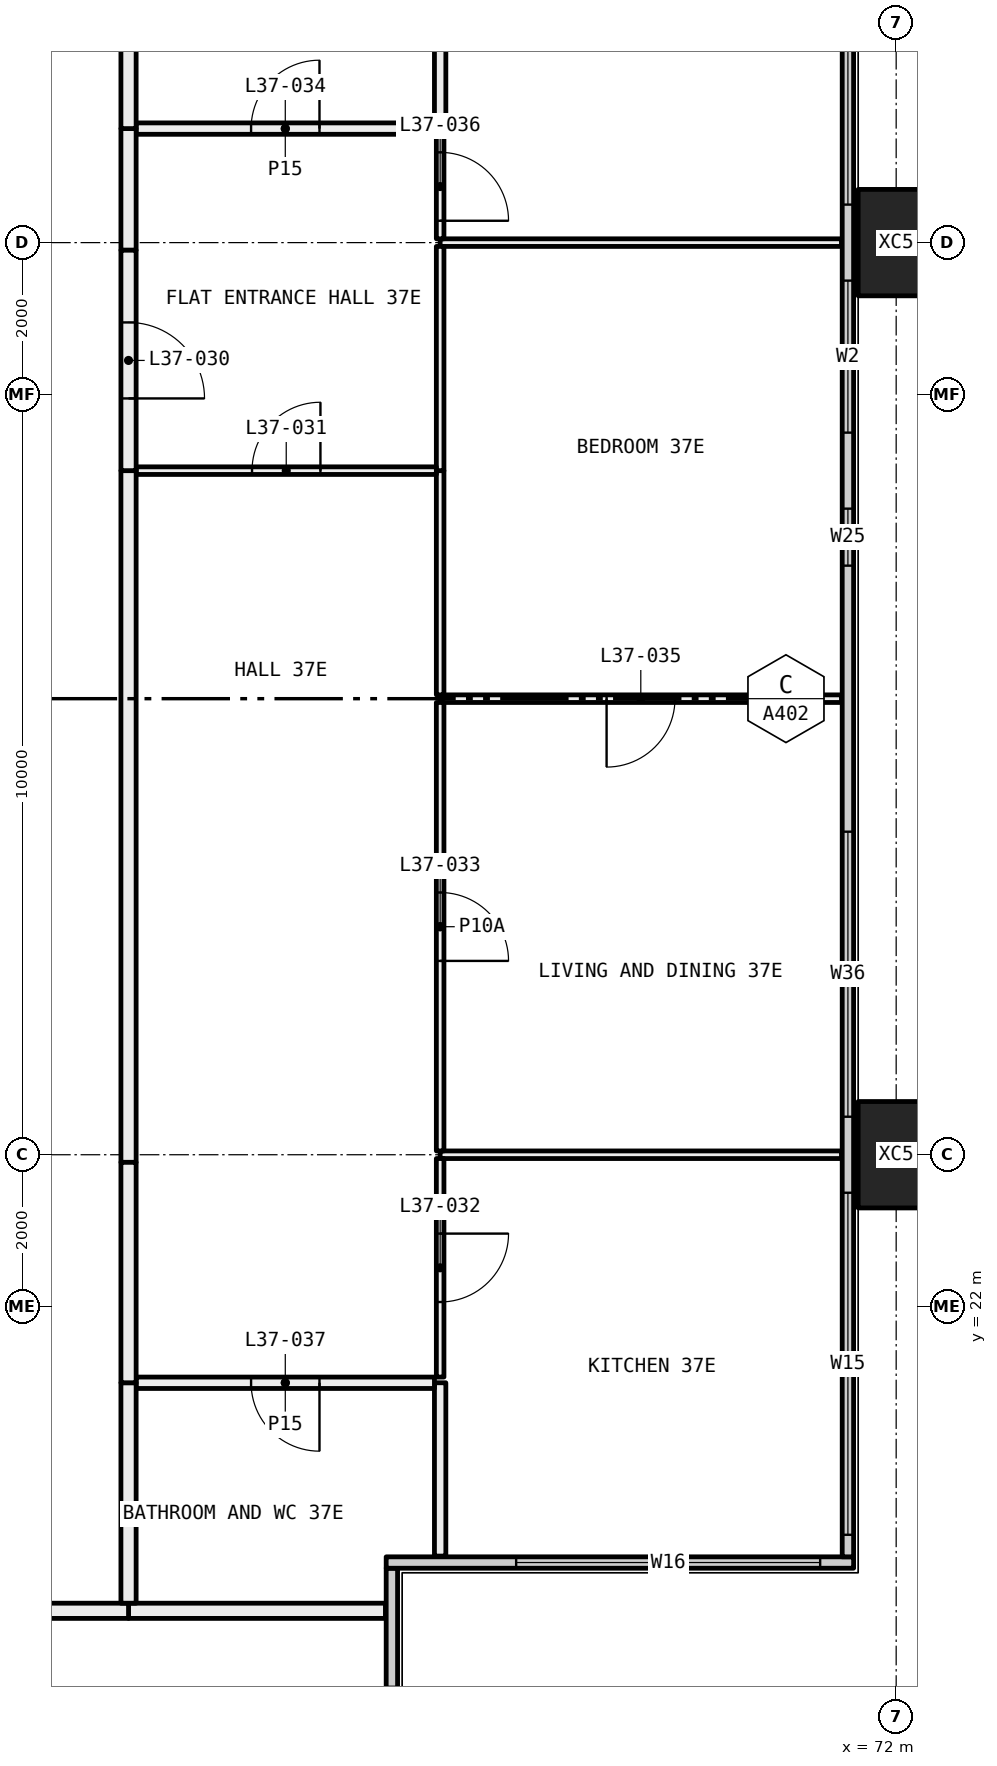
"""IFC4 building model, lengths in metres.
Left out: names, types, materials, properties, quantities, classifications, styles, units other than length and angle.
Written with IfcOpenShell. Run it as: python <this file> out.ifc"""

import sys

from ifc_helpers import new_model, si_unit, direction, frame, frame_2d, origin, origin_2d, place, context, subcontext, project, spatial, rectangle, hollow_rectangle, extrude, element, fill, save


model = new_model("IFC4")
c1 = context("Model", 3, precision=1e-05, world=origin(), true_north=direction((0.0, 1.0)))
c2 = subcontext(c1, "Body", "Model", "MODEL_VIEW")
j1 = project(units=[si_unit("LENGTHUNIT", "METRE"), si_unit("PLANEANGLEUNIT", "RADIAN")], contexts=[c1])
p1 = place(None, origin())
s1 = spatial("IfcSite", under=j1, at=p1, CompositionType="ELEMENT")
p2 = place(p1, origin())
s2 = spatial("IfcBuilding", under=s1, at=p2, CompositionType="ELEMENT")
p3 = place(p2, frame((0.0, 0.0, 141.45)))
s3 = spatial("IfcBuildingStorey", under=s2, at=p3, CompositionType="ELEMENT", Elevation=141.45)
for number, where, z_axis, x_axis in (
    (1, (72.0, 24.0, -0.4), (0.0, 0.0, 1.0), (0.0, 1.0, 0.0)),
    (2, (72.0, 36.0, -0.4), (0.0, 0.0, 1.0), (0.0, 1.0, 0.0)),
):
    element("IfcColumn", number, at=place(p3, frame(where, z_axis=z_axis, x_axis=x_axis)), inside=s3, PredefinedType="COLUMN", context=c2, shape_type="SweptSolid", body=[
        extrude(hollow_rectangle(XDim=1.4, YDim=1.0, WallThickness=0.055, at=origin_2d()), origin(), (0.0, 0.0, 1.0), 3.45),
    ])
p4 = place(p3, frame((65.365, 12.71, 0.0), z_axis=(0.0, 0.0, 1.0), x_axis=(0.0, 1.0, 0.0)))
e3 = element("IfcWall", 3, at=p4, inside=s3, PredefinedType="ELEMENTEDWALL", context=c2, shape_type="SweptSolid", body=[
    extrude(rectangle(XDim=5.85, YDim=0.15, at=frame_2d((2.925, 0.0))), origin(), (0.0, 0.0, 1.0), 3.05),
])
p5 = place(p4, frame((0.29, 0.0, 0.45)))
e4 = element("IfcOpeningElement", 4, at=p5, cuts=e3, PredefinedType="OPENING", context=c2, shape_type="SweptSolid", body=[
    extrude(rectangle(XDim=4.0, YDim=2.55, at=frame_2d((2.0, 1.275))), frame((0.0, 0.085, 0.0), z_axis=(0.0, -1.0, 0.0), x_axis=(1.0, 0.0, 0.0)), (0.0, 0.0, 1.0), 0.17),
])
p6 = place(p3, frame((65.29, 18.635, 0.0), z_axis=(0.0, 0.0, 1.0), x_axis=(1.0, 0.0, 0.0)))
e5 = element("IfcWall", 5, at=p6, inside=s3, PredefinedType="ELEMENTEDWALL", context=c2, shape_type="SweptSolid", body=[
    extrude(rectangle(XDim=6.15, YDim=0.15, at=frame_2d((3.075, 0.0))), origin(), (0.0, 0.0, 1.0), 3.05),
])
p7 = place(p6, frame((1.71, 0.0, 0.45)))
e6 = element("IfcOpeningElement", 6, at=p7, cuts=e5, PredefinedType="OPENING", context=c2, shape_type="SweptSolid", body=[
    extrude(rectangle(XDim=4.0, YDim=2.55, at=frame_2d((2.0, 1.275))), frame((0.0, 0.085, 0.0), z_axis=(0.0, -1.0, 0.0), x_axis=(1.0, 0.0, 0.0)), (0.0, 0.0, 1.0), 0.17),
])
p8 = place(p3, frame((71.365, 18.71, 0.0), z_axis=(0.0, 0.0, 1.0), x_axis=(0.0, 1.0, 0.0)))
e7 = element("IfcWall", 7, at=p8, inside=s3, PredefinedType="ELEMENTEDWALL", context=c2, shape_type="SweptSolid", body=[
    extrude(rectangle(XDim=22.58, YDim=0.15, at=frame_2d((11.29, 0.0))), origin(), (0.0, 0.0, 1.0), 3.05),
])
p9 = place(p8, frame((0.29, 0.0, 0.45)))
e8 = element("IfcOpeningElement", 8, at=p9, cuts=e7, PredefinedType="OPENING", context=c2, shape_type="SweptSolid", body=[
    extrude(rectangle(XDim=4.5, YDim=2.55, at=frame_2d((2.25, 1.275))), frame((0.0, 0.085, 0.0), z_axis=(0.0, -1.0, 0.0), x_axis=(1.0, 0.0, 0.0)), (0.0, 0.0, 1.0), 0.17),
])
p10 = place(p8, frame((5.79, 0.0, 0.45)))
e9 = element("IfcOpeningElement", 9, at=p10, cuts=e7, PredefinedType="OPENING", context=c2, shape_type="SweptSolid", body=[
    extrude(rectangle(XDim=3.75, YDim=2.55, at=frame_2d((1.875, 1.275))), frame((0.0, 0.085, 0.0), z_axis=(0.0, -1.0, 0.0), x_axis=(1.0, 0.0, 0.0)), (0.0, 0.0, 1.0), 0.17),
])
p11 = place(p8, frame((13.04, 0.0, 0.45)))
e10 = element("IfcOpeningElement", 10, at=p11, cuts=e7, PredefinedType="OPENING", context=c2, shape_type="SweptSolid", body=[
    extrude(rectangle(XDim=0.75, YDim=2.55, at=frame_2d((0.375, 1.275))), frame((0.0, 0.085, 0.0), z_axis=(0.0, -1.0, 0.0), x_axis=(1.0, 0.0, 0.0)), (0.0, 0.0, 1.0), 0.17),
])
p12 = place(p8, frame((14.79, 0.0, 0.45)))
e11 = element("IfcOpeningElement", 11, at=p12, cuts=e7, PredefinedType="OPENING", context=c2, shape_type="SweptSolid", body=[
    extrude(rectangle(XDim=2.0, YDim=2.55, at=frame_2d((1.0, 1.275))), frame((0.0, 0.085, 0.0), z_axis=(0.0, -1.0, 0.0), x_axis=(1.0, 0.0, 0.0)), (0.0, 0.0, 1.0), 0.17),
])
p13 = place(p8, frame((17.79, 0.0, 0.45)))
e12 = element("IfcOpeningElement", 12, at=p13, cuts=e7, PredefinedType="OPENING", context=c2, shape_type="SweptSolid", body=[
    extrude(rectangle(XDim=4.5, YDim=2.55, at=frame_2d((2.25, 1.275))), frame((0.0, 0.085, 0.0), z_axis=(0.0, -1.0, 0.0), x_axis=(1.0, 0.0, 0.0)), (0.0, 0.0, 1.0), 0.17),
])
p14 = place(p3, frame((65.28, 18.0, 0.0), z_axis=(0.0, 0.0, 1.0), x_axis=(-1.0, 0.0, 0.0)))
e13 = element("IfcWall", 13, at=p14, inside=s3, PredefinedType="PARTITIONING", context=c2, shape_type="SweptSolid", body=[
    extrude(rectangle(XDim=3.38, YDim=0.2, at=frame_2d((1.69, 0.0))), origin(), (0.0, 0.0, 1.0), 3.05),
])
p15 = place(p3, frame((61.9, 18.0, 0.0), z_axis=(0.0, 0.0, 1.0), x_axis=(-1.0, 0.0, 0.0)))
e14 = element("IfcWall", 14, at=p15, inside=s3, PredefinedType="PARTITIONING", context=c2, shape_type="SweptSolid", body=[
    extrude(rectangle(XDim=1.9, YDim=0.2, at=frame_2d((0.95, 0.0))), origin(), (0.0, 0.0, 1.0), 3.05),
])
p16 = place(p3, frame((71.28, 24.0, 0.0), z_axis=(0.0, 0.0, 1.0), x_axis=(-1.0, 0.0, 0.0)))
e15 = element("IfcWall", 15, at=p16, inside=s3, PredefinedType="PARTITIONING", context=c2, shape_type="SweptSolid", body=[
    extrude(rectangle(XDim=5.28, YDim=0.1, at=frame_2d((2.64, 0.0))), origin(), (0.0, 0.0, 1.0), 2.45),
])
p17 = place(p3, frame((66.0, 21.0, 0.0), z_axis=(0.0, 0.0, 1.0), x_axis=(0.0, -1.0, 0.0)))
e16 = element("IfcWall", 16, at=p17, inside=s3, PredefinedType="PARTITIONING", context=c2, shape_type="SweptSolid", body=[
    extrude(rectangle(XDim=2.28, YDim=0.15, at=frame_2d((1.14, 0.0))), origin(), (0.0, 0.0, 1.0), 3.05),
])
p18 = place(p3, frame((66.0, 23.95, 0.0), z_axis=(0.0, 0.0, 1.0), x_axis=(0.0, -1.0, 0.0)))
e17 = element("IfcWall", 17, at=p18, inside=s3, PredefinedType="PARTITIONING", context=c2, shape_type="SweptSolid", body=[
    extrude(rectangle(XDim=2.875, YDim=0.1, at=frame_2d((1.438, 0.0))), origin(), (0.0, 0.0, 1.0), 2.45),
])
p19 = place(p18, frame((0.988, 0.0, 0.0)))
e18 = element("IfcOpeningElement", 18, at=p19, cuts=e17, PredefinedType="OPENING", context=c2, shape_type="SweptSolid", body=[
    extrude(rectangle(XDim=0.9, YDim=2.1, at=frame_2d((0.45, 1.05))), frame((0.0, 0.06, 0.0), z_axis=(0.0, -1.0, 0.0), x_axis=(1.0, 0.0, 0.0)), (0.0, 0.0, 1.0), 0.12),
])
p20 = place(p3, frame((71.28, 30.0, 0.0), z_axis=(0.0, 0.0, 1.0), x_axis=(-1.0, 0.0, 0.0)))
e19 = element("IfcWall", 19, at=p20, inside=s3, PredefinedType="PARTITIONING", context=c2, shape_type="SweptSolid", body=[
    extrude(rectangle(XDim=5.28, YDim=0.1, at=frame_2d((2.64, 0.0))), origin(), (0.0, 0.0, 1.0), 3.05),
])
p21 = place(p20, frame((2.19, 0.0, 0.0)))
e20 = element("IfcOpeningElement", 20, at=p21, cuts=e19, PredefinedType="OPENING", context=c2, shape_type="SweptSolid", body=[
    extrude(rectangle(XDim=0.9, YDim=2.1, at=frame_2d((0.45, 1.05))), frame((0.0, 0.06, 0.0), z_axis=(0.0, -1.0, 0.0), x_axis=(1.0, 0.0, 0.0)), (0.0, 0.0, 1.0), 0.12),
])
p22 = place(p3, frame((66.0, 29.95, 0.0), z_axis=(0.0, 0.0, 1.0), x_axis=(0.0, -1.0, 0.0)))
e21 = element("IfcWall", 21, at=p22, inside=s3, PredefinedType="PARTITIONING", context=c2, shape_type="SweptSolid", body=[
    extrude(rectangle(XDim=5.9, YDim=0.1, at=frame_2d((2.95, 0.0))), origin(), (0.0, 0.0, 1.0), 2.45),
])
p23 = place(p22, frame((2.5, 0.0, 0.0)))
e22 = element("IfcOpeningElement", 22, at=p23, cuts=e21, PredefinedType="OPENING", context=c2, shape_type="SweptSolid", body=[
    extrude(rectangle(XDim=0.9, YDim=2.1, at=frame_2d((0.45, 1.05))), frame((0.0, 0.06, 0.0), z_axis=(0.0, -1.0, 0.0), x_axis=(1.0, 0.0, 0.0)), (0.0, 0.0, 1.0), 0.12),
])
p24 = place(p3, frame((71.28, 36.0, 0.0), z_axis=(0.0, 0.0, 1.0), x_axis=(-1.0, 0.0, 0.0)))
e23 = element("IfcWall", 23, at=p24, inside=s3, PredefinedType="PARTITIONING", context=c2, shape_type="SweptSolid", body=[
    extrude(rectangle(XDim=5.28, YDim=0.1, at=frame_2d((2.64, 0.0))), origin(), (0.0, 0.0, 1.0), 2.45),
])
p25 = place(p3, frame((66.0, 33.0, 0.0), z_axis=(0.0, 0.0, 1.0), x_axis=(0.0, -1.0, 0.0)))
e24 = element("IfcWall", 24, at=p25, inside=s3, PredefinedType="PARTITIONING", context=c2, shape_type="SweptSolid", body=[
    extrude(rectangle(XDim=2.95, YDim=0.1, at=frame_2d((1.475, 0.0))), origin(), (0.0, 0.0, 1.0), 3.05),
])
p26 = place(p3, frame((66.0, 35.95, 0.0), z_axis=(0.0, 0.0, 1.0), x_axis=(0.0, -1.0, 0.0)))
e25 = element("IfcWall", 25, at=p26, inside=s3, PredefinedType="PARTITIONING", context=c2, shape_type="SweptSolid", body=[
    extrude(rectangle(XDim=2.95, YDim=0.1, at=frame_2d((1.475, 0.0))), origin(), (0.0, 0.0, 1.0), 2.45),
])
p27 = place(p3, frame((66.0, 37.425, 0.0), z_axis=(0.0, 0.0, 1.0), x_axis=(0.0, -1.0, 0.0)))
e26 = element("IfcWall", 26, at=p27, inside=s3, PredefinedType="PARTITIONING", context=c2, shape_type="SweptSolid", body=[
    extrude(rectangle(XDim=1.375, YDim=0.1, at=frame_2d((0.688, 0.0))), origin(), (0.0, 0.0, 1.0), 2.45),
])
p28 = place(p27, frame((0.238, 0.0, 0.0)))
e27 = element("IfcOpeningElement", 27, at=p28, cuts=e26, PredefinedType="OPENING", context=c2, shape_type="SweptSolid", body=[
    extrude(rectangle(XDim=0.9, YDim=2.1, at=frame_2d((0.45, 1.05))), frame((0.0, 0.06, 0.0), z_axis=(0.0, -1.0, 0.0), x_axis=(1.0, 0.0, 0.0)), (0.0, 0.0, 1.0), 0.12),
])
p29 = place(p3, frame((66.0, 41.28, 0.0), z_axis=(0.0, 0.0, 1.0), x_axis=(0.0, -1.0, 0.0)))
e28 = element("IfcWall", 28, at=p29, inside=s3, PredefinedType="PARTITIONING", context=c2, shape_type="SweptSolid", body=[
    extrude(rectangle(XDim=3.78, YDim=0.15, at=frame_2d((1.89, 0.0))), origin(), (0.0, 0.0, 1.0), 3.05),
])
p30 = place(p3, frame((65.925, 21.0, 0.0), z_axis=(0.0, 0.0, 1.0), x_axis=(-1.0, 0.0, 0.0)))
e29 = element("IfcWall", 29, at=p30, inside=s3, PredefinedType="PARTITIONING", context=c2, shape_type="SweptSolid", body=[
    extrude(rectangle(XDim=3.925, YDim=0.15, at=frame_2d((1.962, 0.0))), origin(), (0.0, 0.0, 1.0), 3.05),
])
p31 = place(p30, frame((1.512, 0.0, 0.0)))
e30 = element("IfcOpeningElement", 30, at=p31, cuts=e29, PredefinedType="OPENING", context=c2, shape_type="SweptSolid", body=[
    extrude(rectangle(XDim=0.9, YDim=2.1, at=frame_2d((0.45, 1.05))), frame((0.0, 0.085, 0.0), z_axis=(0.0, -1.0, 0.0), x_axis=(1.0, 0.0, 0.0)), (0.0, 0.0, 1.0), 0.17),
])
p32 = place(p3, frame((61.9, 21.0, 0.0), z_axis=(0.0, 0.0, 1.0), x_axis=(0.0, -1.0, 0.0)))
e31 = element("IfcWall", 31, at=p32, inside=s3, PredefinedType="PARTITIONING", context=c2, shape_type="SweptSolid", body=[
    extrude(rectangle(XDim=2.9, YDim=0.2, at=frame_2d((1.45, 0.0))), origin(), (0.0, 0.0, 1.0), 3.05),
])
p33 = place(p3, frame((65.95, 33.0, 0.0), z_axis=(0.0, 0.0, 1.0), x_axis=(-1.0, 0.0, 0.0)))
e32 = element("IfcWall", 32, at=p33, inside=s3, PredefinedType="PARTITIONING", context=c2, shape_type="SweptSolid", body=[
    extrude(rectangle(XDim=3.95, YDim=0.1, at=frame_2d((1.975, 0.0))), origin(), (0.0, 0.0, 1.0), 3.05),
])
p34 = place(p33, frame((1.525, 0.0, 0.0)))
e33 = element("IfcOpeningElement", 33, at=p34, cuts=e32, PredefinedType="OPENING", context=c2, shape_type="SweptSolid", body=[
    extrude(rectangle(XDim=0.9, YDim=2.1, at=frame_2d((0.45, 1.05))), frame((0.0, 0.06, 0.0), z_axis=(0.0, -1.0, 0.0), x_axis=(1.0, 0.0, 0.0)), (0.0, 0.0, 1.0), 0.12),
])
p35 = place(p3, frame((61.9, 33.0, 0.0), z_axis=(0.0, 0.0, 1.0), x_axis=(0.0, -1.0, 0.0)))
e34 = element("IfcWall", 34, at=p35, inside=s3, PredefinedType="PARTITIONING", context=c2, shape_type="SweptSolid", body=[
    extrude(rectangle(XDim=9.1, YDim=0.2, at=frame_2d((4.55, 0.0))), origin(), (0.0, 0.0, 1.0), 2.45),
])
p36 = place(p3, frame((61.9, 23.9, 0.0), z_axis=(0.0, 0.0, 1.0), x_axis=(0.0, -1.0, 0.0)))
e35 = element("IfcWall", 35, at=p36, inside=s3, PredefinedType="PARTITIONING", context=c2, shape_type="SweptSolid", body=[
    extrude(rectangle(XDim=2.9, YDim=0.2, at=frame_2d((1.45, 0.0))), origin(), (0.0, 0.0, 1.0), 3.05),
])
p37 = place(p3, frame((65.925, 37.5, 0.0), z_axis=(0.0, 0.0, 1.0), x_axis=(-1.0, 0.0, 0.0)))
e36 = element("IfcWall", 36, at=p37, inside=s3, PredefinedType="PARTITIONING", context=c2, shape_type="SweptSolid", body=[
    extrude(rectangle(XDim=3.925, YDim=0.15, at=frame_2d((1.962, 0.0))), origin(), (0.0, 0.0, 1.0), 3.05),
])
p38 = place(p37, frame((1.512, 0.0, 0.0)))
e37 = element("IfcOpeningElement", 37, at=p38, cuts=e36, PredefinedType="OPENING", context=c2, shape_type="SweptSolid", body=[
    extrude(rectangle(XDim=0.9, YDim=2.1, at=frame_2d((0.45, 1.05))), frame((0.0, 0.085, 0.0), z_axis=(0.0, -1.0, 0.0), x_axis=(1.0, 0.0, 0.0)), (0.0, 0.0, 1.0), 0.17),
])
p39 = place(p3, frame((61.9, 37.5, 0.0), z_axis=(0.0, 0.0, 1.0), x_axis=(0.0, -1.0, 0.0)))
e38 = element("IfcWall", 38, at=p39, inside=s3, PredefinedType="PARTITIONING", context=c2, shape_type="SweptSolid", body=[
    extrude(rectangle(XDim=1.6, YDim=0.2, at=frame_2d((0.8, 0.0))), origin(), (0.0, 0.0, 1.0), 2.45),
])
p40 = place(p3, frame((61.9, 35.9, 0.0), z_axis=(0.0, 0.0, 1.0), x_axis=(0.0, -1.0, 0.0)))
e39 = element("IfcWall", 39, at=p40, inside=s3, PredefinedType="PARTITIONING", context=c2, shape_type="SweptSolid", body=[
    extrude(rectangle(XDim=2.9, YDim=0.2, at=frame_2d((1.45, 0.0))), origin(), (0.0, 0.0, 1.0), 3.05),
])
p41 = place(p40, frame((0.95, 0.0, 0.0)))
e40 = element("IfcOpeningElement", 40, at=p41, cuts=e39, PredefinedType="OPENING", context=c2, shape_type="SweptSolid", body=[
    extrude(rectangle(XDim=1.0, YDim=2.1, at=frame_2d((0.5, 1.05))), frame((0.0, 0.11, 0.0), z_axis=(0.0, -1.0, 0.0), x_axis=(1.0, 0.0, 0.0)), (0.0, 0.0, 1.0), 0.22),
])
p42 = place(p3, frame((61.9, 41.9, 0.0), z_axis=(0.0, 0.0, 1.0), x_axis=(0.0, -1.0, 0.0)))
e41 = element("IfcWall", 41, at=p42, inside=s3, PredefinedType="PARTITIONING", context=c2, shape_type="SweptSolid", body=[
    extrude(rectangle(XDim=4.4, YDim=0.2, at=frame_2d((2.2, 0.0))), origin(), (0.0, 0.0, 1.0), 3.05),
])
p43 = place(p7, origin())
e42 = element("IfcWindow", 42, at=p43, inside=s3, PartitioningType="SINGLE_PANEL", PredefinedType="WINDOW", context=c2, shape_type="SweptSolid", body=[
    extrude(rectangle(XDim=4.0, YDim=2.55, at=frame_2d((2.0, 1.275))), frame((0.0, 0.03, 0.0), z_axis=(0.0, -1.0, 0.0), x_axis=(1.0, 0.0, 0.0)), (0.0, 0.0, 1.0), 0.06),
])
fill(e6, e42)
p44 = place(p9, origin())
e43 = element("IfcWindow", 43, at=p44, inside=s3, PartitioningType="SINGLE_PANEL", PredefinedType="WINDOW", context=c2, shape_type="SweptSolid", body=[
    extrude(rectangle(XDim=4.5, YDim=2.55, at=frame_2d((2.25, 1.275))), frame((0.0, 0.03, 0.0), z_axis=(0.0, -1.0, 0.0), x_axis=(1.0, 0.0, 0.0)), (0.0, 0.0, 1.0), 0.06),
])
fill(e8, e43)
p45 = place(p10, origin())
e44 = element("IfcWindow", 44, at=p45, inside=s3, PartitioningType="SINGLE_PANEL", PredefinedType="WINDOW", context=c2, shape_type="SweptSolid", body=[
    extrude(rectangle(XDim=3.75, YDim=2.55, at=frame_2d((1.875, 1.275))), frame((0.0, 0.03, 0.0), z_axis=(0.0, -1.0, 0.0), x_axis=(1.0, 0.0, 0.0)), (0.0, 0.0, 1.0), 0.06),
])
fill(e9, e44)
p46 = place(p11, origin())
e45 = element("IfcWindow", 45, at=p46, inside=s3, PartitioningType="SINGLE_PANEL", PredefinedType="WINDOW", context=c2, shape_type="SweptSolid", body=[
    extrude(rectangle(XDim=0.75, YDim=2.55, at=frame_2d((0.375, 1.275))), frame((0.0, 0.03, 0.0), z_axis=(0.0, -1.0, 0.0), x_axis=(1.0, 0.0, 0.0)), (0.0, 0.0, 1.0), 0.06),
])
fill(e10, e45)
p47 = place(p12, origin())
e46 = element("IfcWindow", 46, at=p47, inside=s3, PartitioningType="SINGLE_PANEL", PredefinedType="WINDOW", context=c2, shape_type="SweptSolid", body=[
    extrude(rectangle(XDim=2.0, YDim=2.55, at=frame_2d((1.0, 1.275))), frame((0.0, 0.03, 0.0), z_axis=(0.0, -1.0, 0.0), x_axis=(1.0, 0.0, 0.0)), (0.0, 0.0, 1.0), 0.06),
])
fill(e11, e46)
p48 = place(p13, origin())
e47 = element("IfcWindow", 47, at=p48, inside=s3, PartitioningType="SINGLE_PANEL", PredefinedType="WINDOW", context=c2, shape_type="SweptSolid", body=[
    extrude(rectangle(XDim=4.5, YDim=2.55, at=frame_2d((2.25, 1.275))), frame((0.0, 0.03, 0.0), z_axis=(0.0, -1.0, 0.0), x_axis=(1.0, 0.0, 0.0)), (0.0, 0.0, 1.0), 0.06),
])
fill(e12, e47)
p49 = place(p41, origin())
e48 = element("IfcDoor", 48, at=p49, inside=s3, OperationType="SINGLE_SWING_LEFT", PredefinedType="DOOR", context=c2, shape_type="SweptSolid", body=[
    extrude(rectangle(XDim=1.0, YDim=2.1, at=frame_2d((0.5, 1.05))), frame((0.0, 0.025, 0.0), z_axis=(0.0, -1.0, 0.0), x_axis=(1.0, 0.0, 0.0)), (0.0, 0.0, 1.0), 0.05),
])
fill(e40, e48)
p50 = place(p34, frame((0.9, 0.0, 0.0), x_axis=(-1.0, 0.0, 0.0)))
e49 = element("IfcDoor", 49, at=p50, inside=s3, OperationType="SINGLE_SWING_LEFT", PredefinedType="DOOR", context=c2, shape_type="SweptSolid", body=[
    extrude(rectangle(XDim=0.9, YDim=2.1, at=frame_2d((0.45, 1.05))), frame((0.0, 0.025, 0.0), z_axis=(0.0, -1.0, 0.0), x_axis=(1.0, 0.0, 0.0)), (0.0, 0.0, 1.0), 0.05),
])
fill(e33, e49)
p51 = place(p19, origin())
e50 = element("IfcDoor", 50, at=p51, inside=s3, OperationType="SINGLE_SWING_RIGHT", PredefinedType="DOOR", context=c2, shape_type="SweptSolid", body=[
    extrude(rectangle(XDim=0.9, YDim=2.1, at=frame_2d((0.45, 1.05))), frame((0.0, 0.025, 0.0), z_axis=(0.0, -1.0, 0.0), x_axis=(1.0, 0.0, 0.0)), (0.0, 0.0, 1.0), 0.05),
])
fill(e18, e50)
p52 = place(p23, origin())
e51 = element("IfcDoor", 51, at=p52, inside=s3, OperationType="SINGLE_SWING_LEFT", PredefinedType="DOOR", context=c2, shape_type="SweptSolid", body=[
    extrude(rectangle(XDim=0.9, YDim=2.1, at=frame_2d((0.45, 1.05))), frame((0.0, 0.025, 0.0), z_axis=(0.0, -1.0, 0.0), x_axis=(1.0, 0.0, 0.0)), (0.0, 0.0, 1.0), 0.05),
])
fill(e22, e51)
p53 = place(p38, frame((0.9, 0.0, 0.0), x_axis=(-1.0, 0.0, 0.0)))
e52 = element("IfcDoor", 52, at=p53, inside=s3, OperationType="SINGLE_SWING_LEFT", PredefinedType="DOOR", context=c2, shape_type="SweptSolid", body=[
    extrude(rectangle(XDim=0.9, YDim=2.1, at=frame_2d((0.45, 1.05))), frame((0.0, 0.025, 0.0), z_axis=(0.0, -1.0, 0.0), x_axis=(1.0, 0.0, 0.0)), (0.0, 0.0, 1.0), 0.05),
])
fill(e37, e52)
p54 = place(p21, origin())
e53 = element("IfcDoor", 53, at=p54, inside=s3, OperationType="SINGLE_SWING_LEFT", PredefinedType="DOOR", context=c2, shape_type="SweptSolid", body=[
    extrude(rectangle(XDim=0.9, YDim=2.1, at=frame_2d((0.45, 1.05))), frame((0.0, 0.025, 0.0), z_axis=(0.0, -1.0, 0.0), x_axis=(1.0, 0.0, 0.0)), (0.0, 0.0, 1.0), 0.05),
])
fill(e20, e53)
p55 = place(p28, origin())
e54 = element("IfcDoor", 54, at=p55, inside=s3, OperationType="SINGLE_SWING_LEFT", PredefinedType="DOOR", context=c2, shape_type="SweptSolid", body=[
    extrude(rectangle(XDim=0.9, YDim=2.1, at=frame_2d((0.45, 1.05))), frame((0.0, 0.025, 0.0), z_axis=(0.0, -1.0, 0.0), x_axis=(1.0, 0.0, 0.0)), (0.0, 0.0, 1.0), 0.05),
])
fill(e27, e54)
p56 = place(p31, origin())
e55 = element("IfcDoor", 55, at=p56, inside=s3, OperationType="SINGLE_SWING_RIGHT", PredefinedType="DOOR", context=c2, shape_type="SweptSolid", body=[
    extrude(rectangle(XDim=0.9, YDim=2.1, at=frame_2d((0.45, 1.05))), frame((0.0, 0.025, 0.0), z_axis=(0.0, -1.0, 0.0), x_axis=(1.0, 0.0, 0.0)), (0.0, 0.0, 1.0), 0.05),
])
fill(e30, e55)
save(model, sys.argv[1])
